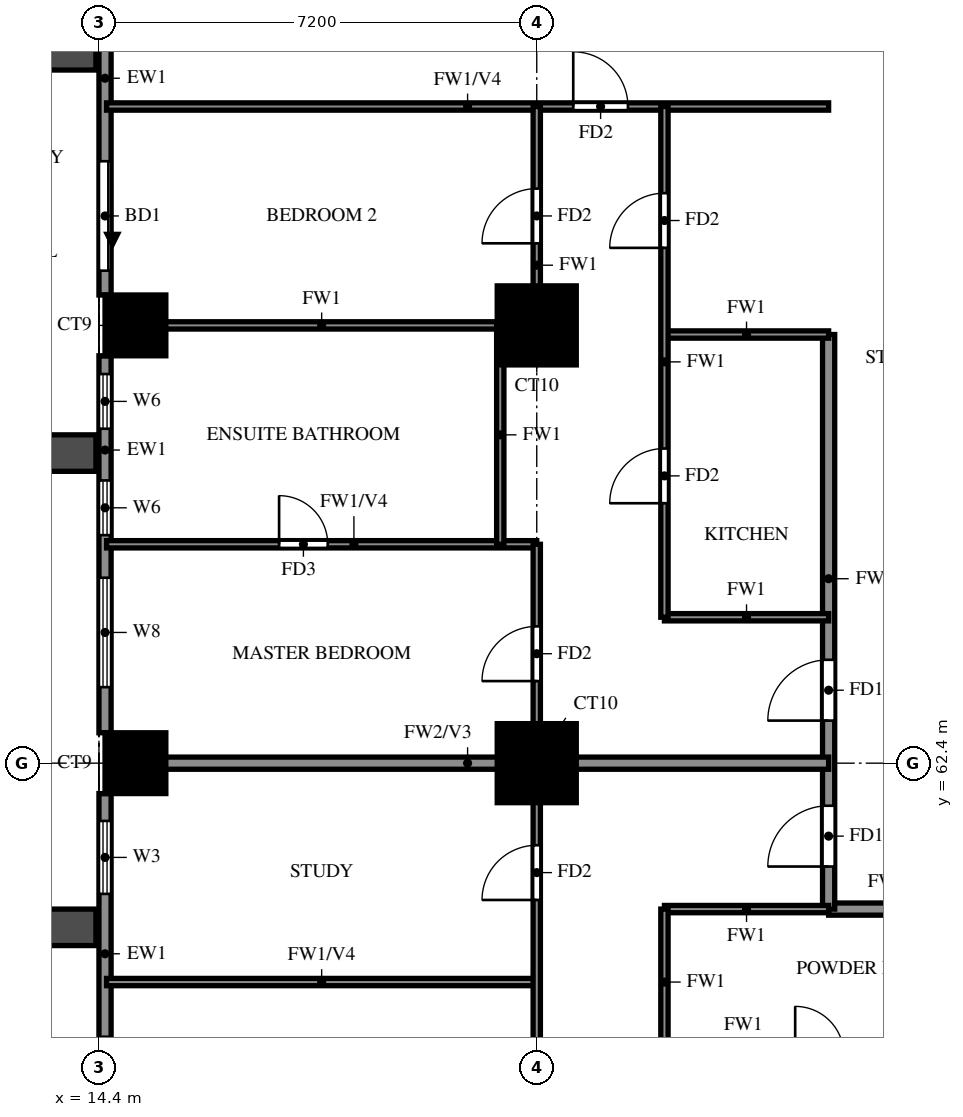
"""IFC4 building model, lengths in metres.
Left out: names, types, materials, properties, quantities, classifications, styles, units other than length and angle.
Written with IfcOpenShell. Run it as: python <this file> out.ifc"""

import sys

from ifc_helpers import new_model, si_unit, direction, frame, frame_2d, origin, origin_2d, place, context, subcontext, project, spatial, rectangle, extrude, source, transform, mapped, element, fill, save


model = new_model("IFC4")
c1 = context("Model", 3, precision=1e-05, world=origin(), true_north=direction((0.0, 1.0)))
c2 = subcontext(c1, "Body", "Model", "MODEL_VIEW")
j1 = project(units=[si_unit("LENGTHUNIT", "METRE"), si_unit("PLANEANGLEUNIT", "RADIAN")], contexts=[c1])
p1 = place(None, origin())
s1 = spatial("IfcSite", under=j1, at=p1, CompositionType="ELEMENT")
p2 = place(p1, origin())
s2 = spatial("IfcBuilding", under=s1, at=p2, CompositionType="ELEMENT")
p3 = place(p2, frame((0.0, 0.0, 86.5)))
s3 = spatial("IfcBuildingStorey", under=s2, at=p3, CompositionType="ELEMENT", Elevation=86.5)
m1 = source(origin(), c2, "Body", "SweptSolid", [
    extrude(rectangle(XDim=1.0, YDim=1.0, at=origin_2d()), origin(), (0.0, 0.0, 1.0), 3.18),
])
p4 = place(p3, frame((15.0, 62.4, 0.0), z_axis=(0.0, 0.0, 1.0), x_axis=(1.0, 0.0, 0.0)))
e1 = element("IfcColumn", 1, at=p4, inside=s3, PredefinedType="COLUMN", context=c2, shape_type="MappedRepresentation", body=[
    mapped(m1, transform((0.0, 0.0, 0.0))),
])
m2 = source(origin(), c2, "Body", "SweptSolid", [
    extrude(rectangle(XDim=1.3, YDim=1.3, at=origin_2d()), origin(), (0.0, 0.0, 1.0), 3.18),
])
p5 = place(p3, frame((21.6, 62.4, 0.0), z_axis=(0.0, 0.0, 1.0), x_axis=(1.0, 0.0, 0.0)))
e2 = element("IfcColumn", 2, at=p5, inside=s3, PredefinedType="COLUMN", context=c2, shape_type="MappedRepresentation", body=[
    mapped(m2, transform((0.0, 0.0, 0.0))),
])
p6 = place(p3, frame((15.0, 69.6, 0.0), z_axis=(0.0, 0.0, 1.0), x_axis=(1.0, 0.0, 0.0)))
e3 = element("IfcColumn", 3, at=p6, inside=s3, PredefinedType="COLUMN", context=c2, shape_type="MappedRepresentation", body=[
    mapped(m1, transform((0.0, 0.0, 0.0))),
])
p7 = place(p3, frame((21.6, 69.6, 0.0), z_axis=(0.0, 0.0, 1.0), x_axis=(1.0, 0.0, 0.0)))
e4 = element("IfcColumn", 4, at=p7, inside=s3, PredefinedType="COLUMN", context=c2, shape_type="MappedRepresentation", body=[
    mapped(m2, transform((0.0, 0.0, 0.0))),
])
p8 = place(p3, frame((14.5, 76.3, 0.0), z_axis=(0.0, 0.0, 1.0), x_axis=(0.0, -1.0, 0.0)))
e5 = element("IfcWall", 5, at=p8, inside=s3, PredefinedType="SOLIDWALL", context=c2, shape_type="SweptSolid", body=[
    extrude(rectangle(XDim=6.2, YDim=0.2, at=frame_2d((3.1, 0.0))), origin(), (0.0, 0.0, 1.0), 3.18),
])
p9 = place(p8, frame((4.0, 0.0, 0.0)))
e6 = element("IfcOpeningElement", 6, at=p9, cuts=e5, PredefinedType="OPENING", context=c2, shape_type="SweptSolid", body=[
    extrude(rectangle(XDim=1.8, YDim=2.4, at=frame_2d((0.9, 1.2))), frame((0.0, 0.11, 0.0), z_axis=(0.0, -1.0, 0.0), x_axis=(1.0, 0.0, 0.0)), (0.0, 0.0, 1.0), 0.22),
])
p10 = place(p8, frame((0.45, 0.0, 0.6)))
e7 = element("IfcOpeningElement", 7, at=p10, cuts=e5, PredefinedType="OPENING", context=c2, shape_type="SweptSolid", body=[
    extrude(rectangle(XDim=1.2, YDim=2.4, at=frame_2d((0.6, 1.2))), frame((0.0, 0.11, 0.0), z_axis=(0.0, -1.0, 0.0), x_axis=(1.0, 0.0, 0.0)), (0.0, 0.0, 1.0), 0.22),
])
p11 = place(p3, frame((14.5, 69.1, 0.0), z_axis=(0.0, 0.0, 1.0), x_axis=(0.0, -1.0, 0.0)))
e8 = element("IfcWall", 8, at=p11, inside=s3, PredefinedType="SOLIDWALL", context=c2, shape_type="SweptSolid", body=[
    extrude(rectangle(XDim=6.2, YDim=0.2, at=frame_2d((3.1, 0.0))), origin(), (0.0, 0.0, 1.0), 3.18),
])
p12 = place(p11, frame((3.65, 0.0, 0.6)))
e9 = element("IfcOpeningElement", 9, at=p12, cuts=e8, PredefinedType="OPENING", context=c2, shape_type="SweptSolid", body=[
    extrude(rectangle(XDim=1.8, YDim=2.4, at=frame_2d((0.9, 1.2))), frame((0.0, 0.11, 0.0), z_axis=(0.0, -1.0, 0.0), x_axis=(1.0, 0.0, 0.0)), (0.0, 0.0, 1.0), 0.22),
])
p13 = place(p11, frame((0.3, 0.0, 1.5)))
e10 = element("IfcOpeningElement", 10, at=p13, cuts=e8, PredefinedType="OPENING", context=c2, shape_type="SweptSolid", body=[
    extrude(rectangle(XDim=0.9, YDim=0.9, at=frame_2d((0.45, 0.45))), frame((0.0, 0.11, 0.0), z_axis=(0.0, -1.0, 0.0), x_axis=(1.0, 0.0, 0.0)), (0.0, 0.0, 1.0), 0.22),
])
p14 = place(p11, frame((2.05, 0.0, 1.5)))
e11 = element("IfcOpeningElement", 11, at=p14, cuts=e8, PredefinedType="OPENING", context=c2, shape_type="SweptSolid", body=[
    extrude(rectangle(XDim=0.9, YDim=0.9, at=frame_2d((0.45, 0.45))), frame((0.0, 0.11, 0.0), z_axis=(0.0, -1.0, 0.0), x_axis=(1.0, 0.0, 0.0)), (0.0, 0.0, 1.0), 0.22),
])
p15 = place(p3, frame((14.5, 61.9, 0.0), z_axis=(0.0, 0.0, 1.0), x_axis=(0.0, -1.0, 0.0)))
e12 = element("IfcWall", 12, at=p15, inside=s3, PredefinedType="SOLIDWALL", context=c2, shape_type="SweptSolid", body=[
    extrude(rectangle(XDim=6.2, YDim=0.2, at=frame_2d((3.1, 0.0))), origin(), (0.0, 0.0, 1.0), 3.18),
])
p16 = place(p15, frame((4.0, 0.0, 0.0)))
e13 = element("IfcOpeningElement", 13, at=p16, cuts=e12, PredefinedType="OPENING", context=c2, shape_type="SweptSolid", body=[
    extrude(rectangle(XDim=1.8, YDim=2.4, at=frame_2d((0.9, 1.2))), frame((0.0, 0.11, 0.0), z_axis=(0.0, -1.0, 0.0), x_axis=(1.0, 0.0, 0.0)), (0.0, 0.0, 1.0), 0.22),
])
p17 = place(p15, frame((0.45, 0.0, 0.6)))
e14 = element("IfcOpeningElement", 14, at=p17, cuts=e12, PredefinedType="OPENING", context=c2, shape_type="SweptSolid", body=[
    extrude(rectangle(XDim=1.2, YDim=2.4, at=frame_2d((0.6, 1.2))), frame((0.0, 0.11, 0.0), z_axis=(0.0, -1.0, 0.0), x_axis=(1.0, 0.0, 0.0)), (0.0, 0.0, 1.0), 0.22),
])
for number, where, z_axis, x_axis in (
    (15, (14.35, 74.1, 0.0), (0.0, 0.0, 1.0), (-1.0, 0.0, 0.0)),
    (16, (14.35, 67.5, 0.0), (0.0, 0.0, 1.0), (-1.0, 0.0, 0.0)),
    (17, (14.35, 59.7, 0.0), (0.0, 0.0, 1.0), (-1.0, 0.0, 0.0)),
):
    element("IfcWall", number, at=place(p3, frame(where, z_axis=z_axis, x_axis=x_axis)), inside=s3, PredefinedType="SOLIDWALL", context=c2, shape_type="SweptSolid", body=[
        extrude(rectangle(XDim=2.65, YDim=0.6, at=frame_2d((1.325, 0.0))), origin(), (0.0, 0.0, 1.0), 2.85),
    ])
p18 = place(p3, frame((26.4, 60.0, 0.0), z_axis=(0.0, 0.0, 1.0), x_axis=(1.0, 0.0, 0.0)))
e18 = element("IfcWall", 18, at=p18, inside=s3, PredefinedType="SOLIDWALL", context=c2, shape_type="SweptSolid", body=[
    extrude(rectangle(XDim=2.4, YDim=0.2, at=frame_2d((1.2, 0.0))), origin(), (0.0, 0.0, 1.0), 3.18),
])
p19 = place(p3, frame((26.4, 60.0, 0.0), z_axis=(0.0, 0.0, 1.0), x_axis=(0.0, 1.0, 0.0)))
e19 = element("IfcWall", 19, at=p19, inside=s3, PredefinedType="SOLIDWALL", context=c2, shape_type="SweptSolid", body=[
    extrude(rectangle(XDim=9.45, YDim=0.2, at=frame_2d((4.725, 0.0))), origin(), (0.0, 0.0, 1.0), 3.18),
])
p20 = place(p19, frame((0.7, 0.0, 0.0)))
e20 = element("IfcOpeningElement", 20, at=p20, cuts=e19, PredefinedType="OPENING", context=c2, shape_type="SweptSolid", body=[
    extrude(rectangle(XDim=1.0, YDim=2.1, at=frame_2d((0.5, 1.05))), frame((0.0, 0.11, 0.0), z_axis=(0.0, -1.0, 0.0), x_axis=(1.0, 0.0, 0.0)), (0.0, 0.0, 1.0), 0.22),
])
p21 = place(p19, frame((3.1, 0.0, 0.0)))
e21 = element("IfcOpeningElement", 21, at=p21, cuts=e19, PredefinedType="OPENING", context=c2, shape_type="SweptSolid", body=[
    extrude(rectangle(XDim=1.0, YDim=2.1, at=frame_2d((0.5, 1.05))), frame((0.0, 0.11, 0.0), z_axis=(0.0, -1.0, 0.0), x_axis=(1.0, 0.0, 0.0)), (0.0, 0.0, 1.0), 0.22),
])
p22 = place(p3, frame((14.525, 62.4, 0.0), z_axis=(0.0, 0.0, 1.0), x_axis=(1.0, 0.0, 0.0)))
e22 = element("IfcWall", 22, at=p22, inside=s3, PredefinedType="SOLIDWALL", context=c2, shape_type="SweptSolid", body=[
    extrude(rectangle(XDim=11.875, YDim=0.2, at=frame_2d((5.938, 0.0))), origin(), (0.0, 0.0, 1.0), 3.18),
])
p23 = place(p3, frame((14.525, 58.8, 0.0), z_axis=(0.0, 0.0, 1.0), x_axis=(1.0, 0.0, 0.0)))
e23 = element("IfcWall", 23, at=p23, inside=s3, PredefinedType="PARTITIONING", context=c2, shape_type="SweptSolid", body=[
    extrude(rectangle(XDim=7.075, YDim=0.12, at=frame_2d((3.538, 0.0))), origin(), (0.0, 0.0, 1.0), 2.28),
])
for number, where, z_axis, x_axis in (
    (24, (23.7, 60.0, 0.0), (0.0, 0.0, 1.0), (1.0, 0.0, 0.0)),
    (25, (23.7, 64.8, 0.0), (0.0, 0.0, 1.0), (1.0, 0.0, 0.0)),
):
    element("IfcWall", number, at=place(p3, frame(where, z_axis=z_axis, x_axis=x_axis)), inside=s3, PredefinedType="PARTITIONING", context=c2, shape_type="SweptSolid", body=[
        extrude(rectangle(XDim=2.7, YDim=0.12, at=frame_2d((1.35, 0.0))), origin(), (0.0, 0.0, 1.0), 3.18),
    ])
p24 = place(p3, frame((14.525, 66.0, 0.0), z_axis=(0.0, 0.0, 1.0), x_axis=(1.0, 0.0, 0.0)))
e26 = element("IfcWall", 26, at=p24, inside=s3, PredefinedType="PARTITIONING", context=c2, shape_type="SweptSolid", body=[
    extrude(rectangle(XDim=7.075, YDim=0.12, at=frame_2d((3.538, 0.0))), origin(), (0.0, 0.0, 1.0), 2.28),
])
p25 = place(p24, frame((2.837, 0.0, 0.0)))
e27 = element("IfcOpeningElement", 27, at=p25, cuts=e26, PredefinedType="OPENING", context=c2, shape_type="SweptSolid", body=[
    extrude(rectangle(XDim=0.8, YDim=2.1, at=frame_2d((0.4, 1.05))), frame((0.0, 0.07, 0.0), z_axis=(0.0, -1.0, 0.0), x_axis=(1.0, 0.0, 0.0)), (0.0, 0.0, 1.0), 0.14),
])
p26 = place(p3, frame((23.7, 69.45, 0.0), z_axis=(0.0, 0.0, 1.0), x_axis=(1.0, 0.0, 0.0)))
e28 = element("IfcWall", 28, at=p26, inside=s3, PredefinedType="PARTITIONING", context=c2, shape_type="SweptSolid", body=[
    extrude(rectangle(XDim=2.7, YDim=0.12, at=frame_2d((1.35, 0.0))), origin(), (0.0, 0.0, 1.0), 3.18),
])
p27 = place(p3, frame((14.525, 69.6, 0.0), z_axis=(0.0, 0.0, 1.0), x_axis=(1.0, 0.0, 0.0)))
e29 = element("IfcWall", 29, at=p27, inside=s3, PredefinedType="PARTITIONING", context=c2, shape_type="SweptSolid", body=[
    extrude(rectangle(XDim=7.075, YDim=0.12, at=frame_2d((3.538, 0.0))), origin(), (0.0, 0.0, 1.0), 3.18),
])
p28 = place(p3, frame((14.525, 73.2, 0.0), z_axis=(0.0, 0.0, 1.0), x_axis=(1.0, 0.0, 0.0)))
e30 = element("IfcWall", 30, at=p28, inside=s3, PredefinedType="PARTITIONING", context=c2, shape_type="SweptSolid", body=[
    extrude(rectangle(XDim=11.875, YDim=0.12, at=frame_2d((5.938, 0.0))), origin(), (0.0, 0.0, 1.0), 2.28),
])
p29 = place(p28, frame((7.675, 0.0, 0.0)))
e31 = element("IfcOpeningElement", 31, at=p29, cuts=e30, PredefinedType="OPENING", context=c2, shape_type="SweptSolid", body=[
    extrude(rectangle(XDim=0.9, YDim=2.1, at=frame_2d((0.45, 1.05))), frame((0.0, 0.07, 0.0), z_axis=(0.0, -1.0, 0.0), x_axis=(1.0, 0.0, 0.0)), (0.0, 0.0, 1.0), 0.14),
])
p30 = place(p3, frame((21.0, 66.0, 0.0), z_axis=(0.0, 0.0, 1.0), x_axis=(0.0, 1.0, 0.0)))
e32 = element("IfcWall", 32, at=p30, inside=s3, PredefinedType="PARTITIONING", context=c2, shape_type="SweptSolid", body=[
    extrude(rectangle(XDim=3.6, YDim=0.12, at=frame_2d((1.8, 0.0))), origin(), (0.0, 0.0, 1.0), 3.18),
])
p31 = place(p3, frame((21.6, 33.725, 0.0), z_axis=(0.0, 0.0, 1.0), x_axis=(0.0, 1.0, 0.0)))
e33 = element("IfcWall", 33, at=p31, inside=s3, PredefinedType="PARTITIONING", context=c2, shape_type="SweptSolid", body=[
    extrude(rectangle(XDim=32.275, YDim=0.12, at=frame_2d((16.137, 0.0))), origin(), (0.0, 0.0, 1.0), 3.18),
])
p32 = place(p31, frame((7.775, 0.0, 0.0)))
e34 = element("IfcOpeningElement", 34, at=p32, cuts=e33, PredefinedType="OPENING", context=c2, shape_type="SweptSolid", body=[
    extrude(rectangle(XDim=0.9, YDim=2.1, at=frame_2d((0.45, 1.05))), frame((0.0, 0.07, 0.0), z_axis=(0.0, -1.0, 0.0), x_axis=(1.0, 0.0, 0.0)), (0.0, 0.0, 1.0), 0.14),
])
p33 = place(p31, frame((15.625, 0.0, 0.0)))
e35 = element("IfcOpeningElement", 35, at=p33, cuts=e33, PredefinedType="OPENING", context=c2, shape_type="SweptSolid", body=[
    extrude(rectangle(XDim=0.9, YDim=2.1, at=frame_2d((0.45, 1.05))), frame((0.0, 0.07, 0.0), z_axis=(0.0, -1.0, 0.0), x_axis=(1.0, 0.0, 0.0)), (0.0, 0.0, 1.0), 0.14),
])
p34 = place(p31, frame((22.225, 0.0, 0.0)))
e36 = element("IfcOpeningElement", 36, at=p34, cuts=e33, PredefinedType="OPENING", context=c2, shape_type="SweptSolid", body=[
    extrude(rectangle(XDim=1.5, YDim=2.1, at=frame_2d((0.75, 1.05))), frame((0.0, 0.07, 0.0), z_axis=(0.0, -1.0, 0.0), x_axis=(1.0, 0.0, 0.0)), (0.0, 0.0, 1.0), 0.14),
])
p35 = place(p31, frame((26.425, 0.0, 0.0)))
e37 = element("IfcOpeningElement", 37, at=p35, cuts=e33, PredefinedType="OPENING", context=c2, shape_type="SweptSolid", body=[
    extrude(rectangle(XDim=0.9, YDim=2.1, at=frame_2d((0.45, 1.05))), frame((0.0, 0.07, 0.0), z_axis=(0.0, -1.0, 0.0), x_axis=(1.0, 0.0, 0.0)), (0.0, 0.0, 1.0), 0.14),
])
p36 = place(p31, frame((30.025, 0.0, 0.0)))
e38 = element("IfcOpeningElement", 38, at=p36, cuts=e33, PredefinedType="OPENING", context=c2, shape_type="SweptSolid", body=[
    extrude(rectangle(XDim=0.9, YDim=2.1, at=frame_2d((0.45, 1.05))), frame((0.0, 0.07, 0.0), z_axis=(0.0, -1.0, 0.0), x_axis=(1.0, 0.0, 0.0)), (0.0, 0.0, 1.0), 0.14),
])
p37 = place(p3, frame((21.6, 69.6, 0.0), z_axis=(0.0, 0.0, 1.0), x_axis=(0.0, 1.0, 0.0)))
e39 = element("IfcWall", 39, at=p37, inside=s3, PredefinedType="PARTITIONING", context=c2, shape_type="SweptSolid", body=[
    extrude(rectangle(XDim=3.6, YDim=0.12, at=frame_2d((1.8, 0.0))), origin(), (0.0, 0.0, 1.0), 3.18),
])
p38 = place(p37, frame((1.35, 0.0, 0.0)))
e40 = element("IfcOpeningElement", 40, at=p38, cuts=e39, PredefinedType="OPENING", context=c2, shape_type="SweptSolid", body=[
    extrude(rectangle(XDim=0.9, YDim=2.1, at=frame_2d((0.45, 1.05))), frame((0.0, 0.07, 0.0), z_axis=(0.0, -1.0, 0.0), x_axis=(1.0, 0.0, 0.0)), (0.0, 0.0, 1.0), 0.14),
])
p39 = place(p3, frame((23.7, 57.6, 0.0), z_axis=(0.0, 0.0, 1.0), x_axis=(0.0, 1.0, 0.0)))
e41 = element("IfcWall", 41, at=p39, inside=s3, PredefinedType="PARTITIONING", context=c2, shape_type="SweptSolid", body=[
    extrude(rectangle(XDim=2.4, YDim=0.12, at=frame_2d((1.2, 0.0))), origin(), (0.0, 0.0, 1.0), 3.18),
])
p40 = place(p3, frame((23.7, 64.8, 0.0), z_axis=(0.0, 0.0, 1.0), x_axis=(0.0, 1.0, 0.0)))
e42 = element("IfcWall", 42, at=p40, inside=s3, PredefinedType="PARTITIONING", context=c2, shape_type="SweptSolid", body=[
    extrude(rectangle(XDim=8.4, YDim=0.12, at=frame_2d((4.2, 0.0))), origin(), (0.0, 0.0, 1.0), 3.18),
])
p41 = place(p40, frame((1.875, 0.0, 0.0)))
e43 = element("IfcOpeningElement", 43, at=p41, cuts=e42, PredefinedType="OPENING", context=c2, shape_type="SweptSolid", body=[
    extrude(rectangle(XDim=0.9, YDim=2.1, at=frame_2d((0.45, 1.05))), frame((0.0, 0.07, 0.0), z_axis=(0.0, -1.0, 0.0), x_axis=(1.0, 0.0, 0.0)), (0.0, 0.0, 1.0), 0.14),
])
p42 = place(p40, frame((6.075, 0.0, 0.0)))
e44 = element("IfcOpeningElement", 44, at=p42, cuts=e42, PredefinedType="OPENING", context=c2, shape_type="SweptSolid", body=[
    extrude(rectangle(XDim=0.9, YDim=2.1, at=frame_2d((0.45, 1.05))), frame((0.0, 0.07, 0.0), z_axis=(0.0, -1.0, 0.0), x_axis=(1.0, 0.0, 0.0)), (0.0, 0.0, 1.0), 0.14),
])
p43 = place(p9, origin())
e45 = element("IfcDoor", 45, at=p43, inside=s3, OperationType="DOUBLE_DOOR_SLIDING", PredefinedType="DOOR", context=c2, shape_type="SweptSolid", body=[
    extrude(rectangle(XDim=1.8, YDim=2.4, at=frame_2d((0.9, 1.2))), frame((0.0, 0.025, 0.0), z_axis=(0.0, -1.0, 0.0), x_axis=(1.0, 0.0, 0.0)), (0.0, 0.0, 1.0), 0.05),
])
fill(e6, e45)
p44 = place(p12, origin())
e46 = element("IfcWindow", 46, at=p44, inside=s3, PartitioningType="DOUBLE_PANEL_VERTICAL", PredefinedType="WINDOW", context=c2, shape_type="SweptSolid", body=[
    extrude(rectangle(XDim=1.8, YDim=2.4, at=frame_2d((0.9, 1.2))), frame((0.0, 0.03, 0.0), z_axis=(0.0, -1.0, 0.0), x_axis=(1.0, 0.0, 0.0)), (0.0, 0.0, 1.0), 0.06),
])
fill(e9, e46)
p45 = place(p13, origin())
e47 = element("IfcWindow", 47, at=p45, inside=s3, PartitioningType="SINGLE_PANEL", PredefinedType="WINDOW", context=c2, shape_type="SweptSolid", body=[
    extrude(rectangle(XDim=0.9, YDim=0.9, at=frame_2d((0.45, 0.45))), frame((0.0, 0.03, 0.0), z_axis=(0.0, -1.0, 0.0), x_axis=(1.0, 0.0, 0.0)), (0.0, 0.0, 1.0), 0.06),
])
fill(e10, e47)
p46 = place(p14, origin())
e48 = element("IfcWindow", 48, at=p46, inside=s3, PartitioningType="SINGLE_PANEL", PredefinedType="WINDOW", context=c2, shape_type="SweptSolid", body=[
    extrude(rectangle(XDim=0.9, YDim=0.9, at=frame_2d((0.45, 0.45))), frame((0.0, 0.03, 0.0), z_axis=(0.0, -1.0, 0.0), x_axis=(1.0, 0.0, 0.0)), (0.0, 0.0, 1.0), 0.06),
])
fill(e11, e48)
p47 = place(p16, origin())
e49 = element("IfcDoor", 49, at=p47, inside=s3, OperationType="DOUBLE_DOOR_SLIDING", PredefinedType="DOOR", context=c2, shape_type="SweptSolid", body=[
    extrude(rectangle(XDim=1.8, YDim=2.4, at=frame_2d((0.9, 1.2))), frame((0.0, 0.025, 0.0), z_axis=(0.0, -1.0, 0.0), x_axis=(1.0, 0.0, 0.0)), (0.0, 0.0, 1.0), 0.05),
])
fill(e13, e49)
p48 = place(p17, origin())
e50 = element("IfcWindow", 50, at=p48, inside=s3, PartitioningType="SINGLE_PANEL", PredefinedType="WINDOW", context=c2, shape_type="SweptSolid", body=[
    extrude(rectangle(XDim=1.2, YDim=2.4, at=frame_2d((0.6, 1.2))), frame((0.0, 0.03, 0.0), z_axis=(0.0, -1.0, 0.0), x_axis=(1.0, 0.0, 0.0)), (0.0, 0.0, 1.0), 0.06),
])
fill(e14, e50)
p49 = place(p20, origin())
e51 = element("IfcDoor", 51, at=p49, inside=s3, OperationType="SINGLE_SWING_LEFT", PredefinedType="DOOR", context=c2, shape_type="SweptSolid", body=[
    extrude(rectangle(XDim=1.0, YDim=2.1, at=frame_2d((0.5, 1.05))), frame((0.0, 0.025, 0.0), z_axis=(0.0, -1.0, 0.0), x_axis=(1.0, 0.0, 0.0)), (0.0, 0.0, 1.0), 0.05),
])
fill(e20, e51)
p50 = place(p35, origin())
e52 = element("IfcDoor", 52, at=p50, inside=s3, OperationType="SINGLE_SWING_LEFT", PredefinedType="DOOR", context=c2, shape_type="SweptSolid", body=[
    extrude(rectangle(XDim=0.9, YDim=2.1, at=frame_2d((0.45, 1.05))), frame((0.0, 0.025, 0.0), z_axis=(0.0, -1.0, 0.0), x_axis=(1.0, 0.0, 0.0)), (0.0, 0.0, 1.0), 0.05),
])
fill(e37, e52)
p51 = place(p21, origin())
e53 = element("IfcDoor", 53, at=p51, inside=s3, OperationType="SINGLE_SWING_RIGHT", PredefinedType="DOOR", context=c2, shape_type="SweptSolid", body=[
    extrude(rectangle(XDim=1.0, YDim=2.1, at=frame_2d((0.5, 1.05))), frame((0.0, 0.025, 0.0), z_axis=(0.0, -1.0, 0.0), x_axis=(1.0, 0.0, 0.0)), (0.0, 0.0, 1.0), 0.05),
])
fill(e21, e53)
p52 = place(p36, origin())
e54 = element("IfcDoor", 54, at=p52, inside=s3, OperationType="SINGLE_SWING_LEFT", PredefinedType="DOOR", context=c2, shape_type="SweptSolid", body=[
    extrude(rectangle(XDim=0.9, YDim=2.1, at=frame_2d((0.45, 1.05))), frame((0.0, 0.025, 0.0), z_axis=(0.0, -1.0, 0.0), x_axis=(1.0, 0.0, 0.0)), (0.0, 0.0, 1.0), 0.05),
])
fill(e38, e54)
p53 = place(p25, origin())
e55 = element("IfcDoor", 55, at=p53, inside=s3, OperationType="SINGLE_SWING_LEFT", PredefinedType="DOOR", context=c2, shape_type="SweptSolid", body=[
    extrude(rectangle(XDim=0.8, YDim=2.1, at=frame_2d((0.4, 1.05))), frame((0.0, 0.025, 0.0), z_axis=(0.0, -1.0, 0.0), x_axis=(1.0, 0.0, 0.0)), (0.0, 0.0, 1.0), 0.05),
])
fill(e27, e55)
p54 = place(p38, origin())
e56 = element("IfcDoor", 56, at=p54, inside=s3, OperationType="SINGLE_SWING_RIGHT", PredefinedType="DOOR", context=c2, shape_type="SweptSolid", body=[
    extrude(rectangle(XDim=0.9, YDim=2.1, at=frame_2d((0.45, 1.05))), frame((0.0, 0.025, 0.0), z_axis=(0.0, -1.0, 0.0), x_axis=(1.0, 0.0, 0.0)), (0.0, 0.0, 1.0), 0.05),
])
fill(e40, e56)
p55 = place(p29, origin())
e57 = element("IfcDoor", 57, at=p55, inside=s3, OperationType="SINGLE_SWING_LEFT", PredefinedType="DOOR", context=c2, shape_type="SweptSolid", body=[
    extrude(rectangle(XDim=0.9, YDim=2.1, at=frame_2d((0.45, 1.05))), frame((0.0, 0.025, 0.0), z_axis=(0.0, -1.0, 0.0), x_axis=(1.0, 0.0, 0.0)), (0.0, 0.0, 1.0), 0.05),
])
fill(e31, e57)
p56 = place(p41, origin())
e58 = element("IfcDoor", 58, at=p56, inside=s3, OperationType="SINGLE_SWING_LEFT", PredefinedType="DOOR", context=c2, shape_type="SweptSolid", body=[
    extrude(rectangle(XDim=0.9, YDim=2.1, at=frame_2d((0.45, 1.05))), frame((0.0, 0.025, 0.0), z_axis=(0.0, -1.0, 0.0), x_axis=(1.0, 0.0, 0.0)), (0.0, 0.0, 1.0), 0.05),
])
fill(e43, e58)
p57 = place(p42, origin())
e59 = element("IfcDoor", 59, at=p57, inside=s3, OperationType="SINGLE_SWING_RIGHT", PredefinedType="DOOR", context=c2, shape_type="SweptSolid", body=[
    extrude(rectangle(XDim=0.9, YDim=2.1, at=frame_2d((0.45, 1.05))), frame((0.0, 0.025, 0.0), z_axis=(0.0, -1.0, 0.0), x_axis=(1.0, 0.0, 0.0)), (0.0, 0.0, 1.0), 0.05),
])
fill(e44, e59)
save(model, sys.argv[1])
